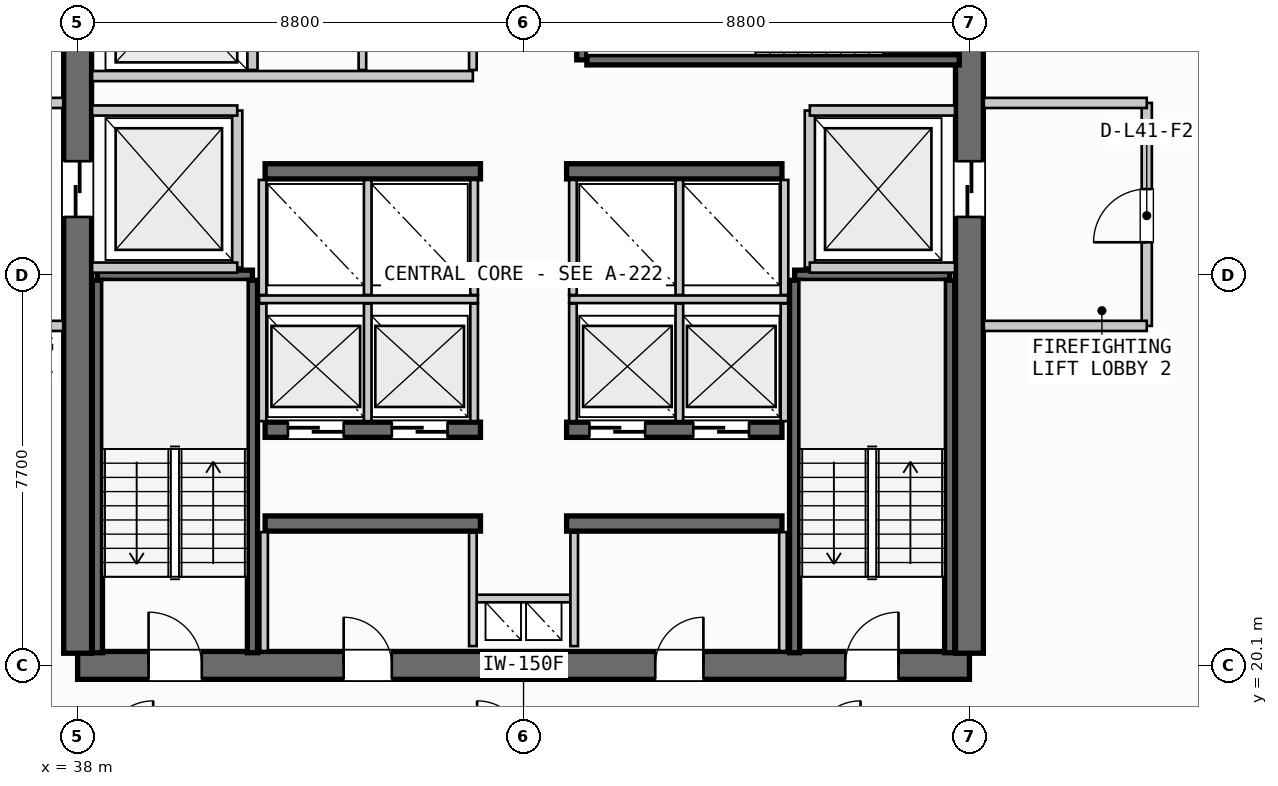
"""IFC4 building model, lengths in metres.
Left out: names, types, materials, properties, quantities, classifications, styles, units other than length and angle.
Written with IfcOpenShell. Run it as: python <this file> out.ifc"""

import sys

from ifc_helpers import new_model, si_unit, direction, frame, frame_2d, origin, place, context, subcontext, project, spatial, rectangle, extrude, source, transform, mapped, element, fill, save


model = new_model("IFC4")
c1 = context("Model", 3, precision=1e-05, world=origin(), true_north=direction((0.0, 1.0)))
c2 = subcontext(c1, "Body", "Model", "MODEL_VIEW")
j1 = project(units=[si_unit("LENGTHUNIT", "METRE"), si_unit("PLANEANGLEUNIT", "RADIAN")], contexts=[c1])
p1 = place(None, origin())
s1 = spatial("IfcSite", under=j1, at=p1, CompositionType="ELEMENT")
p2 = place(p1, origin())
s2 = spatial("IfcBuilding", under=s1, at=p2, CompositionType="ELEMENT")
p3 = place(p2, frame((0.0, 0.0, 160.75)))
s3 = spatial("IfcBuildingStorey", under=s2, at=p3, CompositionType="ELEMENT", Elevation=160.75)
p4 = place(p3, frame((38.0, 20.1, 0.0), z_axis=(0.0, 0.0, 1.0), x_axis=(1.0, 0.0, 0.0)))
e1 = element("IfcWall", 1, at=p4, inside=s3, PredefinedType="SHEAR", context=c2, shape_type="SweptSolid", body=[
    extrude(rectangle(XDim=17.6, YDim=0.55, at=frame_2d((8.8, 0.0))), origin(), (0.0, 0.0, 1.0), 3.3),
])
p5 = place(p4, frame((1.4, 0.0, 0.0)))
e2 = element("IfcOpeningElement", 2, at=p5, cuts=e1, PredefinedType="OPENING", context=c2, shape_type="SweptSolid", body=[
    extrude(rectangle(XDim=1.05, YDim=2.15, at=frame_2d((0.525, 1.075))), frame((0.0, 0.285, 0.0), z_axis=(0.0, -1.0, 0.0), x_axis=(1.0, 0.0, 0.0)), (0.0, 0.0, 1.0), 0.57),
])
p6 = place(p4, frame((15.15, 0.0, 0.0)))
e3 = element("IfcOpeningElement", 3, at=p6, cuts=e1, PredefinedType="OPENING", context=c2, shape_type="SweptSolid", body=[
    extrude(rectangle(XDim=1.05, YDim=2.15, at=frame_2d((0.525, 1.075))), frame((0.0, 0.285, 0.0), z_axis=(0.0, -1.0, 0.0), x_axis=(1.0, 0.0, 0.0)), (0.0, 0.0, 1.0), 0.57),
])
p7 = place(p4, frame((5.25, 0.0, 0.0)))
e4 = element("IfcOpeningElement", 4, at=p7, cuts=e1, PredefinedType="OPENING", context=c2, shape_type="SweptSolid", body=[
    extrude(rectangle(XDim=0.95, YDim=2.15, at=frame_2d((0.475, 1.075))), frame((0.0, 0.285, 0.0), z_axis=(0.0, -1.0, 0.0), x_axis=(1.0, 0.0, 0.0)), (0.0, 0.0, 1.0), 0.57),
])
p8 = place(p4, frame((11.4, 0.0, 0.0)))
e5 = element("IfcOpeningElement", 5, at=p8, cuts=e1, PredefinedType="OPENING", context=c2, shape_type="SweptSolid", body=[
    extrude(rectangle(XDim=0.95, YDim=2.15, at=frame_2d((0.475, 1.075))), frame((0.0, 0.285, 0.0), z_axis=(0.0, -1.0, 0.0), x_axis=(1.0, 0.0, 0.0)), (0.0, 0.0, 1.0), 0.57),
])
p9 = place(p3, frame((38.0, 35.26, 0.0), z_axis=(0.0, 0.0, 1.0), x_axis=(0.0, -1.0, 0.0)))
e6 = element("IfcWall", 6, at=p9, inside=s3, PredefinedType="SHEAR", context=c2, shape_type="SweptSolid", body=[
    extrude(rectangle(XDim=14.92, YDim=0.55, at=frame_2d((7.46, 0.0))), origin(), (0.0, 0.0, 1.0), 3.3),
])
p10 = place(p9, frame((5.21, 0.0, 0.0)))
e7 = element("IfcOpeningElement", 7, at=p10, cuts=e6, PredefinedType="OPENING", context=c2, shape_type="SweptSolid", body=[
    extrude(rectangle(XDim=1.1, YDim=2.2, at=frame_2d((0.55, 1.1))), frame((0.0, 0.285, 0.0), z_axis=(0.0, -1.0, 0.0), x_axis=(1.0, 0.0, 0.0)), (0.0, 0.0, 1.0), 0.57),
])
p11 = place(p3, frame((55.6, 20.34, 0.0), z_axis=(0.0, 0.0, 1.0), x_axis=(0.0, 1.0, 0.0)))
e8 = element("IfcWall", 8, at=p11, inside=s3, PredefinedType="SHEAR", context=c2, shape_type="SweptSolid", body=[
    extrude(rectangle(XDim=14.92, YDim=0.55, at=frame_2d((7.46, 0.0))), origin(), (0.0, 0.0, 1.0), 3.3),
])
p12 = place(p11, frame((12.71, 0.0, 0.0)))
e9 = element("IfcOpeningElement", 9, at=p12, cuts=e8, PredefinedType="OPENING", context=c2, shape_type="SweptSolid", body=[
    extrude(rectangle(XDim=1.05, YDim=2.15, at=frame_2d((0.525, 1.075))), frame((0.0, 0.285, 0.0), z_axis=(0.0, -1.0, 0.0), x_axis=(1.0, 0.0, 0.0)), (0.0, 0.0, 1.0), 0.57),
])
p13 = place(p11, frame((8.61, 0.0, 0.0)))
e10 = element("IfcOpeningElement", 10, at=p13, cuts=e8, PredefinedType="OPENING", context=c2, shape_type="SweptSolid", body=[
    extrude(rectangle(XDim=1.1, YDim=2.2, at=frame_2d((0.55, 1.1))), frame((0.0, 0.285, 0.0), z_axis=(0.0, -1.0, 0.0), x_axis=(1.0, 0.0, 0.0)), (0.0, 0.0, 1.0), 0.57),
])
for number, where, z_axis, x_axis in (
    (11, (41.7, 22.9, 0.0), (0.0, 0.0, 1.0), (1.0, 0.0, 0.0)),
    (12, (47.65, 22.9, 0.0), (0.0, 0.0, 1.0), (1.0, 0.0, 0.0)),
):
    element("IfcWall", number, at=place(p3, frame(where, z_axis=z_axis, x_axis=x_axis)), inside=s3, PredefinedType="SHEAR", context=c2, shape_type="SweptSolid", body=[
        extrude(rectangle(XDim=4.25, YDim=0.3, at=frame_2d((2.125, 0.0))), origin(), (0.0, 0.0, 1.0), 3.3),
    ])
p14 = place(p3, frame((41.7, 24.75, 0.0), z_axis=(0.0, 0.0, 1.0), x_axis=(1.0, 0.0, 0.0)))
e13 = element("IfcWall", 13, at=p14, inside=s3, PredefinedType="SHEAR", context=c2, shape_type="SweptSolid", body=[
    extrude(rectangle(XDim=4.25, YDim=0.3, at=frame_2d((2.125, 0.0))), origin(), (0.0, 0.0, 1.0), 3.3),
])
p15 = place(p14, frame((0.45, 0.0, 0.0)))
e14 = element("IfcOpeningElement", 14, at=p15, cuts=e13, PredefinedType="OPENING", context=c2, shape_type="SweptSolid", body=[
    extrude(rectangle(XDim=1.1, YDim=2.2, at=frame_2d((0.55, 1.1))), frame((0.0, 0.16, 0.0), z_axis=(0.0, -1.0, 0.0), x_axis=(1.0, 0.0, 0.0)), (0.0, 0.0, 1.0), 0.32),
])
p16 = place(p14, frame((2.5, 0.0, 0.0)))
e15 = element("IfcOpeningElement", 15, at=p16, cuts=e13, PredefinedType="OPENING", context=c2, shape_type="SweptSolid", body=[
    extrude(rectangle(XDim=1.1, YDim=2.2, at=frame_2d((0.55, 1.1))), frame((0.0, 0.16, 0.0), z_axis=(0.0, -1.0, 0.0), x_axis=(1.0, 0.0, 0.0)), (0.0, 0.0, 1.0), 0.32),
])
p17 = place(p3, frame((47.65, 24.75, 0.0), z_axis=(0.0, 0.0, 1.0), x_axis=(1.0, 0.0, 0.0)))
e16 = element("IfcWall", 16, at=p17, inside=s3, PredefinedType="SHEAR", context=c2, shape_type="SweptSolid", body=[
    extrude(rectangle(XDim=4.25, YDim=0.3, at=frame_2d((2.125, 0.0))), origin(), (0.0, 0.0, 1.0), 3.3),
])
p18 = place(p17, frame((0.45, 0.0, 0.0)))
e17 = element("IfcOpeningElement", 17, at=p18, cuts=e16, PredefinedType="OPENING", context=c2, shape_type="SweptSolid", body=[
    extrude(rectangle(XDim=1.1, YDim=2.2, at=frame_2d((0.55, 1.1))), frame((0.0, 0.16, 0.0), z_axis=(0.0, -1.0, 0.0), x_axis=(1.0, 0.0, 0.0)), (0.0, 0.0, 1.0), 0.32),
])
p19 = place(p17, frame((2.5, 0.0, 0.0)))
e18 = element("IfcOpeningElement", 18, at=p19, cuts=e16, PredefinedType="OPENING", context=c2, shape_type="SweptSolid", body=[
    extrude(rectangle(XDim=1.1, YDim=2.2, at=frame_2d((0.55, 1.1))), frame((0.0, 0.16, 0.0), z_axis=(0.0, -1.0, 0.0), x_axis=(1.0, 0.0, 0.0)), (0.0, 0.0, 1.0), 0.32),
])
for number, where, z_axis, x_axis in (
    (19, (41.7, 29.85, 0.0), (0.0, 0.0, 1.0), (1.0, 0.0, 0.0)),
    (20, (47.65, 29.85, 0.0), (0.0, 0.0, 1.0), (1.0, 0.0, 0.0)),
):
    element("IfcWall", number, at=place(p3, frame(where, z_axis=z_axis, x_axis=x_axis)), inside=s3, PredefinedType="SHEAR", context=c2, shape_type="SweptSolid", body=[
        extrude(rectangle(XDim=4.25, YDim=0.3, at=frame_2d((2.125, 0.0))), origin(), (0.0, 0.0, 1.0), 3.3),
    ])
p20 = place(p3, frame((38.39, 27.8, 0.0), z_axis=(0.0, 0.0, 1.0), x_axis=(1.0, 0.0, 0.0)))
e21 = element("IfcWall", 21, at=p20, inside=s3, PredefinedType="SHEAR", context=c2, shape_type="SweptSolid", body=[
    extrude(rectangle(XDim=3.06, YDim=0.2, at=frame_2d((1.53, 0.0))), origin(), (0.0, 0.0, 1.0), 3.3),
])
for number, where, z_axis, x_axis in (
    (22, (41.45, 27.7, 0.0), (0.0, 0.0, 1.0), (0.0, -1.0, 0.0)),
    (23, (38.39, 20.35, 0.0), (0.0, 0.0, 1.0), (0.0, 1.0, 0.0)),
):
    element("IfcWall", number, at=place(p3, frame(where, z_axis=z_axis, x_axis=x_axis)), inside=s3, PredefinedType="SHEAR", context=c2, shape_type="SweptSolid", body=[
        extrude(rectangle(XDim=7.35, YDim=0.2, at=frame_2d((3.675, 0.0))), origin(), (0.0, 0.0, 1.0), 3.3),
    ])
p21 = place(p3, frame((52.15, 27.8, 0.0), z_axis=(0.0, 0.0, 1.0), x_axis=(1.0, 0.0, 0.0)))
e24 = element("IfcWall", 24, at=p21, inside=s3, PredefinedType="SHEAR", context=c2, shape_type="SweptSolid", body=[
    extrude(rectangle(XDim=3.06, YDim=0.2, at=frame_2d((1.53, 0.0))), origin(), (0.0, 0.0, 1.0), 3.3),
])
for number, where, z_axis, x_axis in (
    (25, (55.21, 27.7, 0.0), (0.0, 0.0, 1.0), (0.0, -1.0, 0.0)),
    (26, (52.15, 20.35, 0.0), (0.0, 0.0, 1.0), (0.0, 1.0, 0.0)),
):
    element("IfcWall", number, at=place(p3, frame(where, z_axis=z_axis, x_axis=x_axis)), inside=s3, PredefinedType="SHEAR", context=c2, shape_type="SweptSolid", body=[
        extrude(rectangle(XDim=7.35, YDim=0.2, at=frame_2d((3.675, 0.0))), origin(), (0.0, 0.0, 1.0), 3.3),
    ])
p22 = place(p3, frame((47.95, 32.05, 0.0), z_axis=(0.0, 0.0, 1.0), x_axis=(0.0, 1.0, 0.0)))
e27 = element("IfcWall", 27, at=p22, inside=s3, PredefinedType="SHEAR", context=c2, shape_type="SweptSolid", body=[
    extrude(rectangle(XDim=3.06, YDim=0.2, at=frame_2d((1.53, 0.0))), origin(), (0.0, 0.0, 1.0), 3.3),
])
p23 = place(p3, frame((55.4, 32.05, 0.0), z_axis=(0.0, 0.0, 1.0), x_axis=(-1.0, 0.0, 0.0)))
e28 = element("IfcWall", 28, at=p23, inside=s3, PredefinedType="SHEAR", context=c2, shape_type="SweptSolid", body=[
    extrude(rectangle(XDim=7.35, YDim=0.2, at=frame_2d((3.675, 0.0))), origin(), (0.0, 0.0, 1.0), 3.3),
])
p24 = place(p3, frame((45.8, 21.42, 0.0), z_axis=(0.0, 0.0, 1.0), x_axis=(1.0, 0.0, 0.0)))
e29 = element("IfcWall", 29, at=p24, inside=s3, PredefinedType="PARTITIONING", context=c2, shape_type="SweptSolid", body=[
    extrude(rectangle(XDim=2.0, YDim=0.15, at=frame_2d((1.0, 0.0))), origin(), (0.0, 0.0, 1.0), 2.28),
])
for number, where, z_axis, x_axis in (
    (30, (45.8, 20.48, 0.0), (0.0, 0.0, 1.0), (0.0, 1.0, 0.0)),
    (31, (47.8, 20.48, 0.0), (0.0, 0.0, 1.0), (0.0, 1.0, 0.0)),
):
    element("IfcWall", number, at=place(p3, frame(where, z_axis=z_axis, x_axis=x_axis)), inside=s3, PredefinedType="PARTITIONING", context=c2, shape_type="SweptSolid", body=[
        extrude(rectangle(XDim=2.24, YDim=0.15, at=frame_2d((1.12, 0.0))), origin(), (0.0, 0.0, 1.0), 2.28),
    ])
p25 = place(p3, frame((41.15, 27.95, 0.0), z_axis=(0.0, 0.0, 1.0), x_axis=(0.0, 1.0, 0.0)))
e32 = element("IfcWall", 32, at=p25, inside=s3, PredefinedType="PARTITIONING", context=c2, shape_type="SweptSolid", body=[
    extrude(rectangle(XDim=3.1, YDim=0.2, at=frame_2d((1.55, 0.0))), origin(), (0.0, 0.0, 1.0), 2.28),
])
for number, where, z_axis, x_axis in (
    (33, (38.285, 27.95, 0.0), (0.0, 0.0, 1.0), (1.0, 0.0, 0.0)),
    (34, (38.285, 31.05, 0.0), (0.0, 0.0, 1.0), (1.0, 0.0, 0.0)),
):
    element("IfcWall", number, at=place(p3, frame(where, z_axis=z_axis, x_axis=x_axis)), inside=s3, PredefinedType="PARTITIONING", context=c2, shape_type="SweptSolid", body=[
        extrude(rectangle(XDim=2.865, YDim=0.2, at=frame_2d((1.433, 0.0))), origin(), (0.0, 0.0, 1.0), 2.28),
    ])
for number, where, z_axis, x_axis in (
    (35, (34.5, 26.8, 0.0), (0.0, 0.0, 1.0), (1.0, 0.0, 0.0)),
    (36, (34.5, 31.2, 0.0), (0.0, 0.0, 1.0), (1.0, 0.0, 0.0)),
):
    element("IfcWall", number, at=place(p3, frame(where, z_axis=z_axis, x_axis=x_axis)), inside=s3, PredefinedType="PARTITIONING", context=c2, shape_type="SweptSolid", body=[
        extrude(rectangle(XDim=3.215, YDim=0.2, at=frame_2d((1.607, 0.0))), origin(), (0.0, 0.0, 1.0), 2.28),
    ])
p26 = place(p3, frame((52.45, 27.95, 0.0), z_axis=(0.0, 0.0, 1.0), x_axis=(0.0, 1.0, 0.0)))
e37 = element("IfcWall", 37, at=p26, inside=s3, PredefinedType="PARTITIONING", context=c2, shape_type="SweptSolid", body=[
    extrude(rectangle(XDim=3.1, YDim=0.2, at=frame_2d((1.55, 0.0))), origin(), (0.0, 0.0, 1.0), 2.28),
])
for number, where, z_axis, x_axis in (
    (38, (52.45, 27.95, 0.0), (0.0, 0.0, 1.0), (1.0, 0.0, 0.0)),
    (39, (52.45, 31.05, 0.0), (0.0, 0.0, 1.0), (1.0, 0.0, 0.0)),
):
    element("IfcWall", number, at=place(p3, frame(where, z_axis=z_axis, x_axis=x_axis)), inside=s3, PredefinedType="PARTITIONING", context=c2, shape_type="SweptSolid", body=[
        extrude(rectangle(XDim=2.865, YDim=0.2, at=frame_2d((1.433, 0.0))), origin(), (0.0, 0.0, 1.0), 2.28),
    ])
p27 = place(p3, frame((59.1, 26.8, 0.0), z_axis=(0.0, 0.0, 1.0), x_axis=(0.0, 1.0, 0.0)))
e40 = element("IfcWall", 40, at=p27, inside=s3, PredefinedType="PARTITIONING", context=c2, shape_type="SweptSolid", body=[
    extrude(rectangle(XDim=4.4, YDim=0.2, at=frame_2d((2.2, 0.0))), origin(), (0.0, 0.0, 1.0), 2.28),
])
p28 = place(p27, frame((1.65, 0.0, 0.0)))
e41 = element("IfcOpeningElement", 41, at=p28, cuts=e40, PredefinedType="OPENING", context=c2, shape_type="SweptSolid", body=[
    extrude(rectangle(XDim=1.05, YDim=2.15, at=frame_2d((0.525, 1.075))), frame((0.0, 0.11, 0.0), z_axis=(0.0, -1.0, 0.0), x_axis=(1.0, 0.0, 0.0)), (0.0, 0.0, 1.0), 0.22),
])
for number, where, z_axis, x_axis in (
    (42, (55.885, 26.8, 0.0), (0.0, 0.0, 1.0), (1.0, 0.0, 0.0)),
    (43, (55.885, 31.2, 0.0), (0.0, 0.0, 1.0), (1.0, 0.0, 0.0)),
):
    element("IfcWall", number, at=place(p3, frame(where, z_axis=z_axis, x_axis=x_axis)), inside=s3, PredefinedType="PARTITIONING", context=c2, shape_type="SweptSolid", body=[
        extrude(rectangle(XDim=3.215, YDim=0.2, at=frame_2d((1.607, 0.0))), origin(), (0.0, 0.0, 1.0), 2.28),
    ])
for number, where, z_axis, x_axis in (
    (44, (41.68, 20.385, 0.0), (0.0, 0.0, 1.0), (0.0, 1.0, 0.0)),
    (45, (51.92, 20.385, 0.0), (0.0, 0.0, 1.0), (0.0, 1.0, 0.0)),
):
    element("IfcWall", number, at=place(p3, frame(where, z_axis=z_axis, x_axis=x_axis)), inside=s3, PredefinedType="PARTITIONING", context=c2, shape_type="SweptSolid", body=[
        extrude(rectangle(XDim=2.345, YDim=0.15, at=frame_2d((1.172, 0.0))), origin(), (0.0, 0.0, 1.0), 2.28),
    ])
p29 = place(p3, frame((41.58, 27.325, 0.0), z_axis=(0.0, 0.0, 1.0), x_axis=(1.0, 0.0, 0.0)))
e46 = element("IfcWall", 46, at=p29, inside=s3, PredefinedType="PARTITIONING", context=c2, shape_type="SweptSolid", body=[
    extrude(rectangle(XDim=4.32, YDim=0.15, at=frame_2d((2.16, 0.0))), origin(), (0.0, 0.0, 1.0), 2.28),
])
p30 = place(p3, frame((47.7, 27.325, 0.0), z_axis=(0.0, 0.0, 1.0), x_axis=(1.0, 0.0, 0.0)))
e47 = element("IfcWall", 47, at=p30, inside=s3, PredefinedType="PARTITIONING", context=c2, shape_type="SweptSolid", body=[
    extrude(rectangle(XDim=4.32, YDim=0.15, at=frame_2d((2.16, 0.0))), origin(), (0.0, 0.0, 1.0), 2.28),
])
for number, where, z_axis, x_axis in (
    (48, (41.65, 24.92, 0.0), (0.0, 0.0, 1.0), (0.0, 1.0, 0.0)),
    (49, (43.725, 24.92, 0.0), (0.0, 0.0, 1.0), (0.0, 1.0, 0.0)),
    (50, (45.825, 24.92, 0.0), (0.0, 0.0, 1.0), (0.0, 1.0, 0.0)),
    (51, (47.775, 24.92, 0.0), (0.0, 0.0, 1.0), (0.0, 1.0, 0.0)),
    (52, (49.875, 24.92, 0.0), (0.0, 0.0, 1.0), (0.0, 1.0, 0.0)),
    (53, (51.95, 24.92, 0.0), (0.0, 0.0, 1.0), (0.0, 1.0, 0.0)),
):
    element("IfcWall", number, at=place(p3, frame(where, z_axis=z_axis, x_axis=x_axis)), inside=s3, PredefinedType="PARTITIONING", context=c2, shape_type="SweptSolid", body=[
        extrude(rectangle(XDim=2.32, YDim=0.15, at=frame_2d((1.16, 0.0))), origin(), (0.0, 0.0, 1.0), 2.28),
    ])
for number, where, z_axis, x_axis in (
    (54, (41.65, 27.41, 0.0), (0.0, 0.0, 1.0), (0.0, 1.0, 0.0)),
    (55, (43.725, 27.41, 0.0), (0.0, 0.0, 1.0), (0.0, 1.0, 0.0)),
    (56, (45.825, 27.41, 0.0), (0.0, 0.0, 1.0), (0.0, 1.0, 0.0)),
    (57, (47.775, 27.41, 0.0), (0.0, 0.0, 1.0), (0.0, 1.0, 0.0)),
    (58, (49.875, 27.41, 0.0), (0.0, 0.0, 1.0), (0.0, 1.0, 0.0)),
    (59, (51.95, 27.41, 0.0), (0.0, 0.0, 1.0), (0.0, 1.0, 0.0)),
):
    element("IfcWall", number, at=place(p3, frame(where, z_axis=z_axis, x_axis=x_axis)), inside=s3, PredefinedType="PARTITIONING", context=c2, shape_type="SweptSolid", body=[
        extrude(rectangle(XDim=2.27, YDim=0.15, at=frame_2d((1.135, 0.0))), origin(), (0.0, 0.0, 1.0), 2.28),
    ])
p31 = place(p3, frame((41.45, 31.85, 0.0), z_axis=(0.0, 0.0, 1.0), x_axis=(0.0, 1.0, 0.0)))
e60 = element("IfcWall", 60, at=p31, inside=s3, PredefinedType="PARTITIONING", context=c2, shape_type="SweptSolid", body=[
    extrude(rectangle(XDim=3.365, YDim=0.2, at=frame_2d((1.683, 0.0))), origin(), (0.0, 0.0, 1.0), 2.28),
])
p32 = place(p3, frame((38.285, 31.73, 0.0), z_axis=(0.0, 0.0, 1.0), x_axis=(1.0, 0.0, 0.0)))
e61 = element("IfcWall", 61, at=p32, inside=s3, PredefinedType="PARTITIONING", context=c2, shape_type="SweptSolid", body=[
    extrude(rectangle(XDim=7.515, YDim=0.2, at=frame_2d((3.758, 0.0))), origin(), (0.0, 0.0, 1.0), 2.28),
])
p33 = place(p3, frame((45.8, 31.85, 0.0), z_axis=(0.0, 0.0, 1.0), x_axis=(0.0, 1.0, 0.0)))
e62 = element("IfcWall", 62, at=p33, inside=s3, PredefinedType="PARTITIONING", context=c2, shape_type="SweptSolid", body=[
    extrude(rectangle(XDim=3.365, YDim=0.15, at=frame_2d((1.683, 0.0))), origin(), (0.0, 0.0, 1.0), 2.28),
])
p34 = place(p3, frame((43.62, 31.85, 0.0), z_axis=(0.0, 0.0, 1.0), x_axis=(0.0, 1.0, 0.0)))
e63 = element("IfcWall", 63, at=p34, inside=s3, PredefinedType="PLUMBINGWALL", context=c2, shape_type="SweptSolid", body=[
    extrude(rectangle(XDim=3.365, YDim=0.15, at=frame_2d((1.683, 0.0))), origin(), (0.0, 0.0, 1.0), 2.28),
])
m1 = source(origin(), c2, "Body", "SweptSolid", [
    extrude(rectangle(XDim=1.05, YDim=2.15, at=frame_2d((0.525, 1.075))), frame((0.0, 0.025, 0.0), z_axis=(0.0, -1.0, 0.0), x_axis=(1.0, 0.0, 0.0)), (0.0, 0.0, 1.0), 0.05),
])
p35 = place(p5, origin())
e64 = element("IfcDoor", 64, at=p35, inside=s3, OperationType="SINGLE_SWING_LEFT", PredefinedType="DOOR", context=c2, shape_type="MappedRepresentation", body=[
    mapped(m1, transform((0.0, 0.0, 0.0), scale=1.0)),
])
fill(e2, e64)
p36 = place(p6, origin())
e65 = element("IfcDoor", 65, at=p36, inside=s3, OperationType="SINGLE_SWING_RIGHT", PredefinedType="DOOR", context=c2, shape_type="MappedRepresentation", body=[
    mapped(m1, transform((0.0, 0.0, 0.0), scale=1.0)),
])
fill(e3, e65)
m2 = source(origin(), c2, "Body", "SweptSolid", [
    extrude(rectangle(XDim=1.1, YDim=2.2, at=frame_2d((0.55, 1.1))), frame((0.0, 0.025, 0.0), z_axis=(0.0, -1.0, 0.0), x_axis=(1.0, 0.0, 0.0)), (0.0, 0.0, 1.0), 0.05),
])
p37 = place(p10, origin())
e66 = element("IfcDoor", 66, at=p37, inside=s3, OperationType="SLIDING_TO_LEFT", PredefinedType="DOOR", context=c2, shape_type="MappedRepresentation", body=[
    mapped(m2, transform((0.0, 0.0, 0.0), scale=1.0)),
])
fill(e7, e66)
p38 = place(p13, origin())
e67 = element("IfcDoor", 67, at=p38, inside=s3, OperationType="SLIDING_TO_RIGHT", PredefinedType="DOOR", context=c2, shape_type="MappedRepresentation", body=[
    mapped(m2, transform((0.0, 0.0, 0.0), scale=1.0)),
])
fill(e10, e67)
m3 = source(origin(), c2, "Body", "SweptSolid", [
    extrude(rectangle(XDim=0.95, YDim=2.15, at=frame_2d((0.475, 1.075))), frame((0.0, 0.025, 0.0), z_axis=(0.0, -1.0, 0.0), x_axis=(1.0, 0.0, 0.0)), (0.0, 0.0, 1.0), 0.05),
])
p39 = place(p7, origin())
e68 = element("IfcDoor", 68, at=p39, inside=s3, OperationType="SINGLE_SWING_LEFT", PredefinedType="DOOR", context=c2, shape_type="MappedRepresentation", body=[
    mapped(m3, transform((0.0, 0.0, 0.0), scale=1.0)),
])
fill(e4, e68)
p40 = place(p8, origin())
e69 = element("IfcDoor", 69, at=p40, inside=s3, OperationType="SINGLE_SWING_RIGHT", PredefinedType="DOOR", context=c2, shape_type="MappedRepresentation", body=[
    mapped(m3, transform((0.0, 0.0, 0.0), scale=1.0)),
])
fill(e5, e69)
p41 = place(p15, origin())
e70 = element("IfcDoor", 70, at=p41, inside=s3, OperationType="SLIDING_TO_RIGHT", PredefinedType="DOOR", context=c2, shape_type="MappedRepresentation", body=[
    mapped(m2, transform((0.0, 0.0, 0.0), scale=1.0)),
])
fill(e14, e70)
p42 = place(p16, origin())
e71 = element("IfcDoor", 71, at=p42, inside=s3, OperationType="SLIDING_TO_RIGHT", PredefinedType="DOOR", context=c2, shape_type="MappedRepresentation", body=[
    mapped(m2, transform((0.0, 0.0, 0.0), scale=1.0)),
])
fill(e15, e71)
p43 = place(p18, origin())
e72 = element("IfcDoor", 72, at=p43, inside=s3, OperationType="SLIDING_TO_RIGHT", PredefinedType="DOOR", context=c2, shape_type="MappedRepresentation", body=[
    mapped(m2, transform((0.0, 0.0, 0.0), scale=1.0)),
])
fill(e17, e72)
p44 = place(p19, origin())
e73 = element("IfcDoor", 73, at=p44, inside=s3, OperationType="SLIDING_TO_RIGHT", PredefinedType="DOOR", context=c2, shape_type="MappedRepresentation", body=[
    mapped(m2, transform((0.0, 0.0, 0.0), scale=1.0)),
])
fill(e18, e73)
p45 = place(p28, origin())
e74 = element("IfcDoor", 74, at=p45, inside=s3, OperationType="SINGLE_SWING_LEFT", PredefinedType="DOOR", context=c2, shape_type="MappedRepresentation", body=[
    mapped(m1, transform((0.0, 0.0, 0.0), scale=1.0)),
])
fill(e41, e74)
save(model, sys.argv[1])
